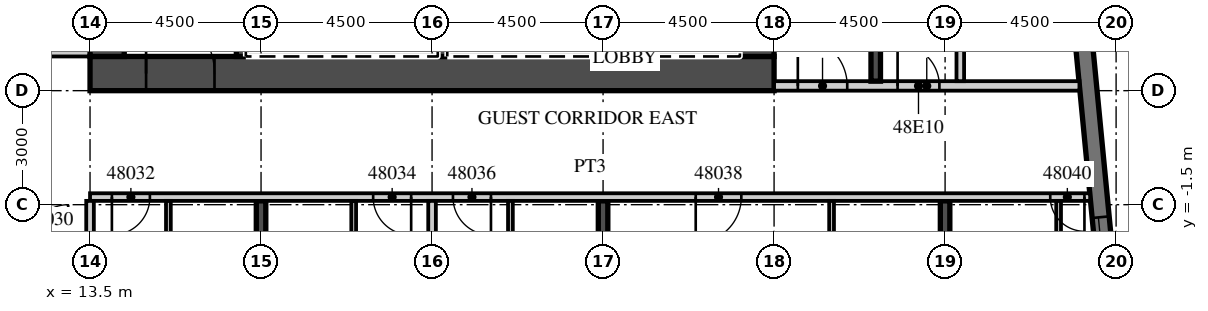
"""IFC4 building model, lengths in metres.
Left out: names, types, materials, properties, quantities, classifications, styles, units other than length and angle.
Written with IfcOpenShell. Run it as: python <this file> out.ifc"""

import sys

from ifc_helpers import new_model, si_unit, direction, frame, frame_2d, origin, place, context, subcontext, project, spatial, rectangle, extrude, element, fill, save


model = new_model("IFC4")
c1 = context("Model", 3, precision=1e-05, world=origin(), true_north=direction((0.0, 1.0)))
c2 = subcontext(c1, "Body", "Model", "MODEL_VIEW")
j1 = project(units=[si_unit("LENGTHUNIT", "METRE"), si_unit("PLANEANGLEUNIT", "RADIAN")], contexts=[c1])
p1 = place(None, origin())
s1 = spatial("IfcSite", under=j1, at=p1, CompositionType="ELEMENT")
p2 = place(p1, origin())
s2 = spatial("IfcBuilding", under=s1, at=p2, CompositionType="ELEMENT")
p3 = place(p2, frame((0.0, 0.0, 199.9)))
s3 = spatial("IfcBuildingStorey", under=s2, at=p3, CompositionType="ELEMENT", Elevation=199.9)
p4 = place(p3, frame((18.0, -19.245, 0.0), z_axis=(0.0, 0.0, 1.0), x_axis=(0.0, 1.0, 0.0)))
e1 = element("IfcWall", 1, at=p4, inside=s3, PredefinedType="SHEAR", context=c2, shape_type="SweptSolid", body=[
    extrude(rectangle(XDim=17.845, YDim=0.25, at=frame_2d((8.923, 0.0))), origin(), (0.0, 0.0, 1.0), 3.3),
])
p5 = place(p3, frame((27.0, -18.379, 0.0), z_axis=(0.0, 0.0, 1.0), x_axis=(0.0, 1.0, 0.0)))
e2 = element("IfcWall", 2, at=p5, inside=s3, PredefinedType="SHEAR", context=c2, shape_type="SweptSolid", body=[
    extrude(rectangle(XDim=16.979, YDim=0.25, at=frame_2d((8.489, 0.0))), origin(), (0.0, 0.0, 1.0), 3.3),
])
p6 = place(p3, frame((36.0, -17.512, 0.0), z_axis=(0.0, 0.0, 1.0), x_axis=(0.0, 1.0, 0.0)))
e3 = element("IfcWall", 3, at=p6, inside=s3, PredefinedType="SHEAR", context=c2, shape_type="SweptSolid", body=[
    extrude(rectangle(XDim=16.112, YDim=0.25, at=frame_2d((8.056, 0.0))), origin(), (0.0, 0.0, 1.0), 3.3),
])
p7 = place(p3, frame((41.214, -13.466, 0.0), z_axis=(0.0, 0.0, 1.0), x_axis=(-0.095847314626, 0.995396047952, 0.0)))
e4 = element("IfcWall", 4, at=p7, inside=s3, PredefinedType="SOLIDWALL", context=c2, shape_type="SweptSolid", body=[
    extrude(rectangle(XDim=34.0, YDim=0.45, at=frame_2d((17.0, 0.0))), origin(), (0.0, 0.0, 1.0), 3.02),
])
p8 = place(p7, frame((3.869, 0.0, 0.45)))
e5 = element("IfcOpeningElement", 5, at=p8, cuts=e4, PredefinedType="OPENING", context=c2, shape_type="SweptSolid", body=[
    extrude(rectangle(XDim=3.3, YDim=2.25, at=frame_2d((1.65, 1.125))), frame((0.0, 0.235, 0.0), z_axis=(0.0, -1.0, 0.0), x_axis=(1.0, 0.0, 0.0)), (0.0, 0.0, 1.0), 0.47),
])
p9 = place(p7, frame((8.39, 0.0, 0.45)))
e6 = element("IfcOpeningElement", 6, at=p9, cuts=e4, PredefinedType="OPENING", context=c2, shape_type="SweptSolid", body=[
    extrude(rectangle(XDim=3.3, YDim=2.25, at=frame_2d((1.65, 1.125))), frame((0.0, 0.235, 0.0), z_axis=(0.0, -1.0, 0.0), x_axis=(1.0, 0.0, 0.0)), (0.0, 0.0, 1.0), 0.47),
])
p10 = place(p3, frame((-13.5, 2.5, 0.0), z_axis=(0.0, 0.0, 1.0), x_axis=(1.0, 0.0, 0.0)))
e7 = element("IfcWall", 7, at=p10, inside=s3, PredefinedType="PARTITIONING", context=c2, shape_type="SweptSolid", body=[
    extrude(rectangle(XDim=27.0, YDim=0.2, at=frame_2d((13.5, 0.0))), origin(), (0.0, 0.0, 1.0), 3.02),
])
p11 = place(p10, frame((2.925, 0.0, 0.0)))
e8 = element("IfcOpeningElement", 8, at=p11, cuts=e7, PredefinedType="OPENING", context=c2, shape_type="SweptSolid", body=[
    extrude(rectangle(XDim=1.0, YDim=2.1, at=frame_2d((0.5, 1.05))), frame((0.0, 0.11, 0.0), z_axis=(0.0, -1.0, 0.0), x_axis=(1.0, 0.0, 0.0)), (0.0, 0.0, 1.0), 0.22),
])
p12 = place(p10, frame((9.863, 0.0, 0.0)))
e9 = element("IfcOpeningElement", 9, at=p12, cuts=e7, PredefinedType="OPENING", context=c2, shape_type="SweptSolid", body=[
    extrude(rectangle(XDim=1.2, YDim=2.1, at=frame_2d((0.6, 1.05))), frame((0.0, 0.11, 0.0), z_axis=(0.0, -1.0, 0.0), x_axis=(1.0, 0.0, 0.0)), (0.0, 0.0, 1.0), 0.22),
])
p13 = place(p10, frame((15.938, 0.0, 0.0)))
e10 = element("IfcOpeningElement", 10, at=p13, cuts=e7, PredefinedType="OPENING", context=c2, shape_type="SweptSolid", body=[
    extrude(rectangle(XDim=1.2, YDim=2.1, at=frame_2d((0.6, 1.05))), frame((0.0, 0.11, 0.0), z_axis=(0.0, -1.0, 0.0), x_axis=(1.0, 0.0, 0.0)), (0.0, 0.0, 1.0), 0.22),
])
p14 = place(p10, frame((23.075, 0.0, 0.0)))
e11 = element("IfcOpeningElement", 11, at=p14, cuts=e7, PredefinedType="OPENING", context=c2, shape_type="SweptSolid", body=[
    extrude(rectangle(XDim=1.0, YDim=2.1, at=frame_2d((0.5, 1.05))), frame((0.0, 0.11, 0.0), z_axis=(0.0, -1.0, 0.0), x_axis=(1.0, 0.0, 0.0)), (0.0, 0.0, 1.0), 0.22),
])
p15 = place(p3, frame((13.5, -1.3, 0.0), z_axis=(0.0, 0.0, 1.0), x_axis=(1.0, 0.0, 0.0)))
e12 = element("IfcWall", 12, at=p15, inside=s3, PredefinedType="PARTITIONING", context=c2, shape_type="SweptSolid", body=[
    extrude(rectangle(XDim=26.317, YDim=0.2, at=frame_2d((13.158, 0.0))), origin(), (0.0, 0.0, 1.0), 3.02),
])
p16 = place(p15, frame((0.575, 0.0, 0.0)))
e13 = element("IfcOpeningElement", 13, at=p16, cuts=e12, PredefinedType="OPENING", context=c2, shape_type="SweptSolid", body=[
    extrude(rectangle(XDim=1.0, YDim=2.1, at=frame_2d((0.5, 1.05))), frame((0.0, 0.11, 0.0), z_axis=(0.0, -1.0, 0.0), x_axis=(1.0, 0.0, 0.0)), (0.0, 0.0, 1.0), 0.22),
])
p17 = place(p15, frame((7.45, 0.0, 0.0)))
e14 = element("IfcOpeningElement", 14, at=p17, cuts=e12, PredefinedType="OPENING", context=c2, shape_type="SweptSolid", body=[
    extrude(rectangle(XDim=1.0, YDim=2.1, at=frame_2d((0.5, 1.05))), frame((0.0, 0.11, 0.0), z_axis=(0.0, -1.0, 0.0), x_axis=(1.0, 0.0, 0.0)), (0.0, 0.0, 1.0), 0.22),
])
p18 = place(p15, frame((9.55, 0.0, 0.0)))
e15 = element("IfcOpeningElement", 15, at=p18, cuts=e12, PredefinedType="OPENING", context=c2, shape_type="SweptSolid", body=[
    extrude(rectangle(XDim=1.0, YDim=2.1, at=frame_2d((0.5, 1.05))), frame((0.0, 0.11, 0.0), z_axis=(0.0, -1.0, 0.0), x_axis=(1.0, 0.0, 0.0)), (0.0, 0.0, 1.0), 0.22),
])
p19 = place(p15, frame((15.938, 0.0, 0.0)))
e16 = element("IfcOpeningElement", 16, at=p19, cuts=e12, PredefinedType="OPENING", context=c2, shape_type="SweptSolid", body=[
    extrude(rectangle(XDim=1.2, YDim=2.1, at=frame_2d((0.6, 1.05))), frame((0.0, 0.11, 0.0), z_axis=(0.0, -1.0, 0.0), x_axis=(1.0, 0.0, 0.0)), (0.0, 0.0, 1.0), 0.22),
])
p20 = place(p15, frame((25.267, 0.0, 0.0)))
e17 = element("IfcOpeningElement", 17, at=p20, cuts=e12, PredefinedType="OPENING", context=c2, shape_type="SweptSolid", body=[
    extrude(rectangle(XDim=0.9, YDim=2.1, at=frame_2d((0.45, 1.05))), frame((0.0, 0.11, 0.0), z_axis=(0.0, -1.0, 0.0), x_axis=(1.0, 0.0, 0.0)), (0.0, 0.0, 1.0), 0.22),
])
p21 = place(p3, frame((13.5, -19.701, 0.0), z_axis=(0.0, 0.0, 1.0), x_axis=(0.0, 1.0, 0.0)))
e18 = element("IfcWall", 18, at=p21, inside=s3, PredefinedType="PARTITIONING", context=c2, shape_type="SweptSolid", body=[
    extrude(rectangle(XDim=18.301, YDim=0.2, at=frame_2d((9.15, 0.0))), origin(), (0.0, 0.0, 1.0), 3.02),
])
p22 = place(p3, frame((15.562, -9.125, 0.0), z_axis=(0.0, 0.0, 1.0), x_axis=(0.0, 1.0, 0.0)))
e19 = element("IfcWall", 19, at=p22, inside=s3, PredefinedType="PARTITIONING", context=c2, shape_type="SweptSolid", body=[
    extrude(rectangle(XDim=7.725, YDim=0.125, at=frame_2d((3.863, 0.0))), origin(), (0.0, 0.0, 1.0), 3.02),
])
p23 = place(p22, frame((4.375, 0.0, 0.0)))
e20 = element("IfcOpeningElement", 20, at=p23, cuts=e19, PredefinedType="OPENING", context=c2, shape_type="SweptSolid", body=[
    extrude(rectangle(XDim=0.9, YDim=2.1, at=frame_2d((0.45, 1.05))), frame((0.0, 0.073, 0.0), z_axis=(0.0, -1.0, 0.0), x_axis=(1.0, 0.0, 0.0)), (0.0, 0.0, 1.0), 0.145),
])
p24 = place(p3, frame((22.5, -18.834, 0.0), z_axis=(0.0, 0.0, 1.0), x_axis=(0.0, 1.0, 0.0)))
e21 = element("IfcWall", 21, at=p24, inside=s3, PredefinedType="PARTITIONING", context=c2, shape_type="SweptSolid", body=[
    extrude(rectangle(XDim=17.434, YDim=0.2, at=frame_2d((8.717, 0.0))), origin(), (0.0, 0.0, 1.0), 3.02),
])
p25 = place(p3, frame((20.438, -9.125, 0.0), z_axis=(0.0, 0.0, 1.0), x_axis=(0.0, 1.0, 0.0)))
e22 = element("IfcWall", 22, at=p25, inside=s3, PredefinedType="PARTITIONING", context=c2, shape_type="SweptSolid", body=[
    extrude(rectangle(XDim=7.725, YDim=0.125, at=frame_2d((3.863, 0.0))), origin(), (0.0, 0.0, 1.0), 3.02),
])
p26 = place(p25, frame((4.375, 0.0, 0.0)))
e23 = element("IfcOpeningElement", 23, at=p26, cuts=e22, PredefinedType="OPENING", context=c2, shape_type="SweptSolid", body=[
    extrude(rectangle(XDim=0.9, YDim=2.1, at=frame_2d((0.45, 1.05))), frame((0.0, 0.073, 0.0), z_axis=(0.0, -1.0, 0.0), x_axis=(1.0, 0.0, 0.0)), (0.0, 0.0, 1.0), 0.145),
])
p27 = place(p3, frame((24.562, -9.125, 0.0), z_axis=(0.0, 0.0, 1.0), x_axis=(0.0, 1.0, 0.0)))
e24 = element("IfcWall", 24, at=p27, inside=s3, PredefinedType="PARTITIONING", context=c2, shape_type="SweptSolid", body=[
    extrude(rectangle(XDim=7.725, YDim=0.125, at=frame_2d((3.863, 0.0))), origin(), (0.0, 0.0, 1.0), 3.02),
])
p28 = place(p27, frame((4.375, 0.0, 0.0)))
e25 = element("IfcOpeningElement", 25, at=p28, cuts=e24, PredefinedType="OPENING", context=c2, shape_type="SweptSolid", body=[
    extrude(rectangle(XDim=0.9, YDim=2.1, at=frame_2d((0.45, 1.05))), frame((0.0, 0.073, 0.0), z_axis=(0.0, -1.0, 0.0), x_axis=(1.0, 0.0, 0.0)), (0.0, 0.0, 1.0), 0.145),
])
p29 = place(p3, frame((33.013, -9.125, 0.0), z_axis=(0.0, 0.0, 1.0), x_axis=(0.0, 1.0, 0.0)))
e26 = element("IfcWall", 26, at=p29, inside=s3, PredefinedType="PARTITIONING", context=c2, shape_type="SweptSolid", body=[
    extrude(rectangle(XDim=7.725, YDim=0.125, at=frame_2d((3.863, 0.0))), origin(), (0.0, 0.0, 1.0), 3.02),
])
p30 = place(p29, frame((4.375, 0.0, 0.0)))
e27 = element("IfcOpeningElement", 27, at=p30, cuts=e26, PredefinedType="OPENING", context=c2, shape_type="SweptSolid", body=[
    extrude(rectangle(XDim=0.9, YDim=2.1, at=frame_2d((0.45, 1.05))), frame((0.0, 0.073, 0.0), z_axis=(0.0, -1.0, 0.0), x_axis=(1.0, 0.0, 0.0)), (0.0, 0.0, 1.0), 0.145),
])
p31 = place(p3, frame((38.987, -6.445, 0.0), z_axis=(0.0, 0.0, 1.0), x_axis=(0.0, 1.0, 0.0)))
e28 = element("IfcWall", 28, at=p31, inside=s3, PredefinedType="PARTITIONING", context=c2, shape_type="SweptSolid", body=[
    extrude(rectangle(XDim=5.045, YDim=0.125, at=frame_2d((2.522, 0.0))), origin(), (0.0, 0.0, 1.0), 3.02),
])
p32 = place(p31, frame((1.695, 0.0, 0.0)))
e29 = element("IfcOpeningElement", 29, at=p32, cuts=e28, PredefinedType="OPENING", context=c2, shape_type="SweptSolid", body=[
    extrude(rectangle(XDim=0.9, YDim=2.1, at=frame_2d((0.45, 1.05))), frame((0.0, 0.073, 0.0), z_axis=(0.0, -1.0, 0.0), x_axis=(1.0, 0.0, 0.0)), (0.0, 0.0, 1.0), 0.145),
])
p33 = place(p3, frame((13.5, 1.95, 0.0), z_axis=(0.0, 0.0, 1.0), x_axis=(1.0, 0.0, 0.0)))
e30 = element("IfcWall", 30, at=p33, inside=s3, PredefinedType="SHEAR", context=c2, shape_type="SweptSolid", body=[
    extrude(rectangle(XDim=18.0, YDim=0.9, at=frame_2d((9.0, 0.0))), origin(), (0.0, 0.0, 1.0), 3.02),
])
p34 = place(p33, frame((1.475, 0.0, 0.0)))
e31 = element("IfcOpeningElement", 31, at=p34, cuts=e30, PredefinedType="OPENING", context=c2, shape_type="SweptSolid", body=[
    extrude(rectangle(XDim=1.8, YDim=2.1, at=frame_2d((0.9, 1.05))), frame((0.0, 0.46, 0.0), z_axis=(0.0, -1.0, 0.0), x_axis=(1.0, 0.0, 0.0)), (0.0, 0.0, 1.0), 0.92),
])
p35 = place(p3, frame((31.05, 2.4, 0.0), z_axis=(0.0, 0.0, 1.0), x_axis=(0.0, 1.0, 0.0)))
e32 = element("IfcWall", 32, at=p35, inside=s3, PredefinedType="SHEAR", context=c2, shape_type="SweptSolid", body=[
    extrude(rectangle(XDim=12.8, YDim=0.9, at=frame_2d((6.4, 0.0))), origin(), (0.0, 0.0, 1.0), 3.02),
])
p36 = place(p35, frame((0.2, 0.0, 0.0)))
e33 = element("IfcOpeningElement", 33, at=p36, cuts=e32, PredefinedType="OPENING", context=c2, shape_type="SweptSolid", body=[
    extrude(rectangle(XDim=1.1, YDim=2.1, at=frame_2d((0.55, 1.05))), frame((0.0, 0.46, 0.0), z_axis=(0.0, -1.0, 0.0), x_axis=(1.0, 0.0, 0.0)), (0.0, 0.0, 1.0), 0.92),
])
p37 = place(p3, frame((13.95, 2.4, 0.0), z_axis=(0.0, 0.0, 1.0), x_axis=(0.0, 1.0, 0.0)))
e34 = element("IfcWall", 34, at=p37, inside=s3, PredefinedType="SHEAR", context=c2, shape_type="SweptSolid", body=[
    extrude(rectangle(XDim=12.2, YDim=0.9, at=frame_2d((6.1, 0.0))), origin(), (0.0, 0.0, 1.0), 3.02),
])
p38 = place(p3, frame((17.475, 2.4, 0.0), z_axis=(0.0, 0.0, 1.0), x_axis=(0.0, 1.0, 0.0)))
e35 = element("IfcWall", 35, at=p38, inside=s3, PredefinedType="SHEAR", context=c2, shape_type="SweptSolid", body=[
    extrude(rectangle(XDim=3.15, YDim=0.25, at=frame_2d((1.575, 0.0))), origin(), (0.0, 0.0, 1.0), 3.02),
])
for number, where, z_axis, x_axis in (
    (36, (27.975, 2.4, 0.0), (0.0, 0.0, 1.0), (0.0, 1.0, 0.0)),
    (37, (22.775, 2.4, 0.0), (0.0, 0.0, 1.0), (0.0, 1.0, 0.0)),
):
    element("IfcWall", number, at=place(p3, frame(where, z_axis=z_axis, x_axis=x_axis)), inside=s3, PredefinedType="SHEAR", context=c2, shape_type="SweptSolid", body=[
        extrude(rectangle(XDim=2.9, YDim=0.25, at=frame_2d((1.45, 0.0))), origin(), (0.0, 0.0, 1.0), 3.02),
    ])
p39 = place(p3, frame((31.5, 1.625, 0.0), z_axis=(0.0, 0.0, 1.0), x_axis=(1.0, 0.0, 0.0)))
e38 = element("IfcWall", 38, at=p39, inside=s3, PredefinedType="PARTITIONING", context=c2, shape_type="SweptSolid", body=[
    extrude(rectangle(XDim=8.035, YDim=0.25, at=frame_2d((4.018, 0.0))), origin(), (0.0, 0.0, 1.0), 3.02),
])
p40 = place(p39, frame((0.625, 0.0, 0.0)))
e39 = element("IfcOpeningElement", 39, at=p40, cuts=e38, PredefinedType="OPENING", context=c2, shape_type="SweptSolid", body=[
    extrude(rectangle(XDim=1.3, YDim=2.1, at=frame_2d((0.65, 1.05))), frame((0.0, 0.135, 0.0), z_axis=(0.0, -1.0, 0.0), x_axis=(1.0, 0.0, 0.0)), (0.0, 0.0, 1.0), 0.27),
])
p41 = place(p39, frame((3.25, 0.0, 0.0)))
e40 = element("IfcOpeningElement", 40, at=p41, cuts=e38, PredefinedType="OPENING", context=c2, shape_type="SweptSolid", body=[
    extrude(rectangle(XDim=1.1, YDim=2.1, at=frame_2d((0.55, 1.05))), frame((0.0, 0.135, 0.0), z_axis=(0.0, -1.0, 0.0), x_axis=(1.0, 0.0, 0.0)), (0.0, 0.0, 1.0), 0.27),
])
p42 = place(p3, frame((34.175, 1.75, 0.0), z_axis=(0.0, 0.0, 1.0), x_axis=(0.0, 1.0, 0.0)))
e41 = element("IfcWall", 41, at=p42, inside=s3, PredefinedType="SHEAR", context=c2, shape_type="SweptSolid", body=[
    extrude(rectangle(XDim=8.35, YDim=0.25, at=frame_2d((4.175, 0.0))), origin(), (0.0, 0.0, 1.0), 3.02),
])
p43 = place(p3, frame((36.4, 1.75, 0.0), z_axis=(0.0, 0.0, 1.0), x_axis=(0.0, 1.0, 0.0)))
e42 = element("IfcWall", 42, at=p43, inside=s3, PredefinedType="PARTITIONING", context=c2, shape_type="SweptSolid", body=[
    extrude(rectangle(XDim=15.95, YDim=0.2, at=frame_2d((7.975, 0.0))), origin(), (0.0, 0.0, 1.0), 3.02),
])
p44 = place(p43, frame((14.7, 0.0, 0.0)))
e43 = element("IfcOpeningElement", 43, at=p44, cuts=e42, PredefinedType="OPENING", context=c2, shape_type="SweptSolid", body=[
    extrude(rectangle(XDim=0.9, YDim=2.1, at=frame_2d((0.45, 1.05))), frame((0.0, 0.11, 0.0), z_axis=(0.0, -1.0, 0.0), x_axis=(1.0, 0.0, 0.0)), (0.0, 0.0, 1.0), 0.22),
])
p45 = place(p9, origin())
e44 = element("IfcWindow", 44, at=p45, inside=s3, PartitioningType="SINGLE_PANEL", PredefinedType="WINDOW", context=c2, shape_type="SweptSolid", body=[
    extrude(rectangle(XDim=3.3, YDim=2.25, at=frame_2d((1.65, 1.125))), frame((0.0, 0.09, 0.0), z_axis=(0.0, -1.0, 0.0), x_axis=(1.0, 0.0, 0.0)), (0.0, 0.0, 1.0), 0.06),
])
fill(e6, e44)
p46 = place(p16, origin())
e45 = element("IfcDoor", 45, at=p46, inside=s3, OperationType="SINGLE_SWING_LEFT", PredefinedType="DOOR", context=c2, shape_type="SweptSolid", body=[
    extrude(rectangle(XDim=1.0, YDim=2.1, at=frame_2d((0.5, 1.05))), frame((0.0, 0.025, 0.0), z_axis=(0.0, -1.0, 0.0), x_axis=(1.0, 0.0, 0.0)), (0.0, 0.0, 1.0), 0.05),
])
fill(e13, e45)
p47 = place(p17, origin())
e46 = element("IfcDoor", 46, at=p47, inside=s3, OperationType="SINGLE_SWING_RIGHT", PredefinedType="DOOR", context=c2, shape_type="SweptSolid", body=[
    extrude(rectangle(XDim=1.0, YDim=2.1, at=frame_2d((0.5, 1.05))), frame((0.0, 0.025, 0.0), z_axis=(0.0, -1.0, 0.0), x_axis=(1.0, 0.0, 0.0)), (0.0, 0.0, 1.0), 0.05),
])
fill(e14, e46)
p48 = place(p18, origin())
e47 = element("IfcDoor", 47, at=p48, inside=s3, OperationType="SINGLE_SWING_RIGHT", PredefinedType="DOOR", context=c2, shape_type="SweptSolid", body=[
    extrude(rectangle(XDim=1.0, YDim=2.1, at=frame_2d((0.5, 1.05))), frame((0.0, 0.025, 0.0), z_axis=(0.0, -1.0, 0.0), x_axis=(1.0, 0.0, 0.0)), (0.0, 0.0, 1.0), 0.05),
])
fill(e15, e47)
p49 = place(p19, origin())
e48 = element("IfcDoor", 48, at=p49, inside=s3, OperationType="SINGLE_SWING_LEFT", PredefinedType="DOOR", context=c2, shape_type="SweptSolid", body=[
    extrude(rectangle(XDim=1.2, YDim=2.1, at=frame_2d((0.6, 1.05))), frame((0.0, 0.025, 0.0), z_axis=(0.0, -1.0, 0.0), x_axis=(1.0, 0.0, 0.0)), (0.0, 0.0, 1.0), 0.05),
])
fill(e16, e48)
p50 = place(p20, origin())
e49 = element("IfcDoor", 49, at=p50, inside=s3, OperationType="SINGLE_SWING_RIGHT", PredefinedType="DOOR", context=c2, shape_type="SweptSolid", body=[
    extrude(rectangle(XDim=0.9, YDim=2.1, at=frame_2d((0.45, 1.05))), frame((0.0, 0.025, 0.0), z_axis=(0.0, -1.0, 0.0), x_axis=(1.0, 0.0, 0.0)), (0.0, 0.0, 1.0), 0.05),
])
fill(e17, e49)
p51 = place(p34, origin())
e50 = element("IfcDoor", 50, at=p51, inside=s3, OperationType="DOUBLE_DOOR_DOUBLE_SWING", PredefinedType="DOOR", context=c2, shape_type="SweptSolid", body=[
    extrude(rectangle(XDim=1.8, YDim=2.1, at=frame_2d((0.9, 1.05))), frame((0.0, 0.025, 0.0), z_axis=(0.0, -1.0, 0.0), x_axis=(1.0, 0.0, 0.0)), (0.0, 0.0, 1.0), 0.05),
])
fill(e31, e50)
p52 = place(p40, origin())
e51 = element("IfcDoor", 51, at=p52, inside=s3, OperationType="SINGLE_SWING_LEFT", PredefinedType="DOOR", context=c2, shape_type="SweptSolid", body=[
    extrude(rectangle(XDim=1.3, YDim=2.1, at=frame_2d((0.65, 1.05))), frame((0.0, 0.025, 0.0), z_axis=(0.0, -1.0, 0.0), x_axis=(1.0, 0.0, 0.0)), (0.0, 0.0, 1.0), 0.05),
])
fill(e39, e51)
p53 = place(p41, origin())
e52 = element("IfcDoor", 52, at=p53, inside=s3, OperationType="SINGLE_SWING_LEFT", PredefinedType="DOOR", context=c2, shape_type="SweptSolid", body=[
    extrude(rectangle(XDim=1.1, YDim=2.1, at=frame_2d((0.55, 1.05))), frame((0.0, 0.025, 0.0), z_axis=(0.0, -1.0, 0.0), x_axis=(1.0, 0.0, 0.0)), (0.0, 0.0, 1.0), 0.05),
])
fill(e40, e52)
save(model, sys.argv[1])
